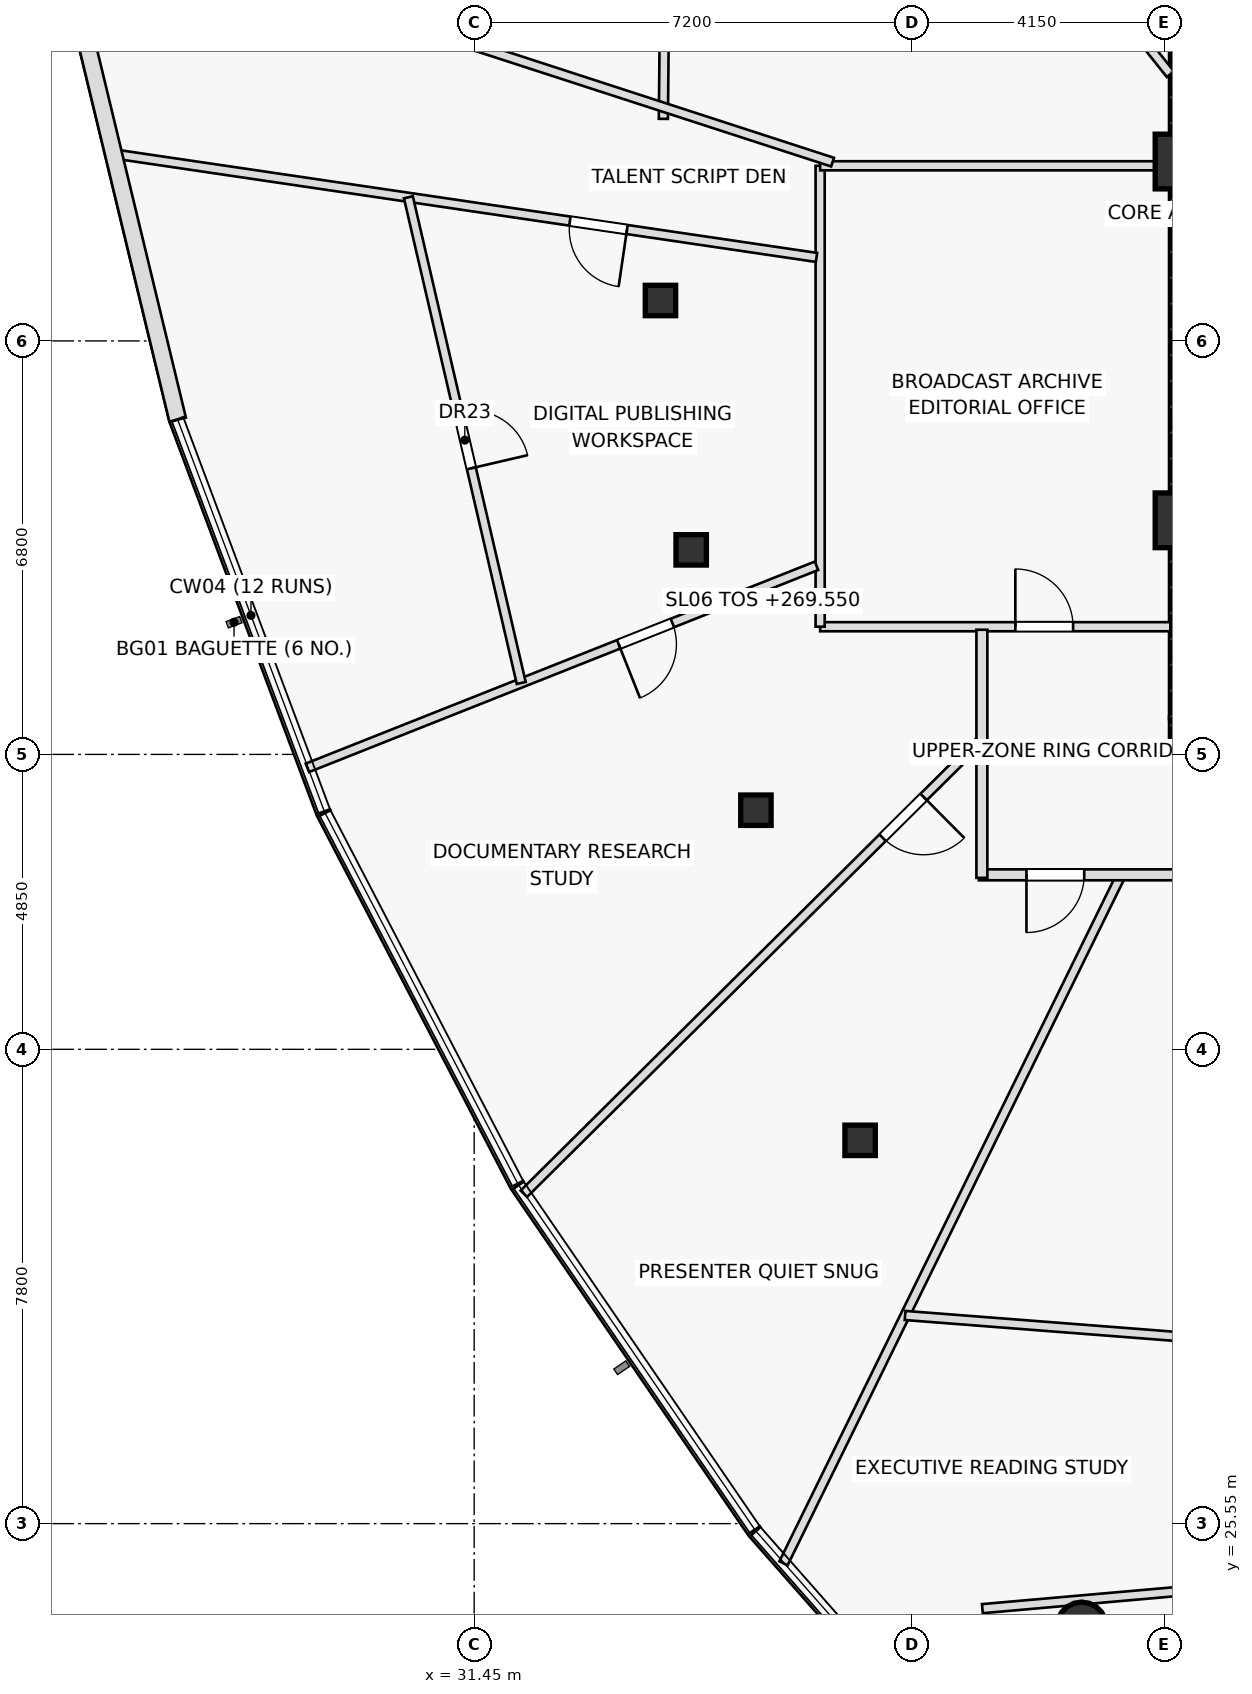
"""IFC4 building model, lengths in metres.
Left out: names, types, materials, properties, quantities, classifications, styles, units other than length and angle.
Written with IfcOpenShell. Run it as: python <this file> out.ifc"""

import sys

from ifc_helpers import new_model, si_unit, direction, frame, frame_2d, origin, origin_2d, place, context, subcontext, project, spatial, rectangle, hollow_rectangle, hollow_circle, extrude, element, fill, save


model = new_model("IFC4")
c1 = context("Model", 3, precision=1e-05, world=origin(), true_north=direction((0.0, 1.0)))
c2 = subcontext(c1, "Body", "Model", "MODEL_VIEW")
j1 = project(units=[si_unit("LENGTHUNIT", "METRE"), si_unit("PLANEANGLEUNIT", "RADIAN")], contexts=[c1])
p1 = place(None, origin())
s1 = spatial("IfcSite", under=j1, at=p1, CompositionType="ELEMENT")
p2 = place(p1, origin())
s2 = spatial("IfcBuilding", under=s1, at=p2, CompositionType="ELEMENT")
p3 = place(p2, frame((0.0, 0.0, 269.55)))
s3 = spatial("IfcBuildingStorey", under=s2, at=p3, CompositionType="ELEMENT", Elevation=269.55)
p4 = place(p3, frame((42.9, 38.55, 0.0), z_axis=(0.0, 0.0, 1.0), x_axis=(1.0, 0.0, 0.0)))
e1 = element("IfcWall", 1, at=p4, inside=s3, PredefinedType="SHEAR", context=c2, shape_type="SweptSolid", body=[
    extrude(rectangle(XDim=14.2, YDim=0.5, at=frame_2d((7.1, 0.0))), origin(), (0.0, 0.0, 1.0), 3.5),
])
p5 = place(p4, frame((0.78, 0.0, 0.0)))
e2 = element("IfcOpeningElement", 2, at=p5, cuts=e1, PredefinedType="OPENING", context=c2, shape_type="SweptSolid", body=[
    extrude(rectangle(XDim=1.05, YDim=2.2, at=frame_2d((0.525, 1.1))), frame((0.0, 0.26, 0.0), z_axis=(0.0, -1.0, 0.0), x_axis=(1.0, 0.0, 0.0)), (0.0, 0.0, 1.0), 0.52),
])
p6 = place(p3, frame((43.15, 38.8, 0.0), z_axis=(0.0, 0.0, 1.0), x_axis=(0.0, 1.0, 0.0)))
e3 = element("IfcWall", 3, at=p6, inside=s3, PredefinedType="SHEAR", context=c2, shape_type="SweptSolid", body=[
    extrude(rectangle(XDim=12.4, YDim=0.5, at=frame_2d((6.2, 0.0))), origin(), (0.0, 0.0, 1.0), 3.5),
])
for number, where, z_axis, x_axis in (
    (4, (43.1, 47.95, 0.0), (0.0, 0.0, 1.0), (1.0, 0.0, 0.0)),
    (5, (43.1, 42.05, 0.0), (0.0, 0.0, 1.0), (1.0, 0.0, 0.0)),
):
    element("IfcColumn", number, at=place(p3, frame(where, z_axis=z_axis, x_axis=x_axis)), inside=s3, PredefinedType="COLUMN", context=c2, shape_type="SweptSolid", body=[
        extrude(rectangle(XDim=0.9, YDim=0.9, at=origin_2d()), origin(), (0.0, 0.0, 1.0), 3.5),
    ])
for number, where, z_axis, x_axis in (
    (6, (34.514, 45.665, 0.0), (0.0, 0.0, 1.0), (1.0, 0.0, 0.0)),
    (7, (35.019, 41.564, 0.0), (0.0, 0.0, 1.0), (1.0, 0.0, 0.0)),
    (8, (36.083, 37.282, 0.0), (0.0, 0.0, 1.0), (1.0, 0.0, 0.0)),
    (9, (37.797, 31.853, 0.0), (0.0, 0.0, 1.0), (1.0, 0.0, 0.0)),
):
    element("IfcColumn", number, at=place(p3, frame(where, z_axis=z_axis, x_axis=x_axis)), inside=s3, PredefinedType="COLUMN", context=c2, shape_type="SweptSolid", body=[
        extrude(hollow_rectangle(XDim=0.5, YDim=0.5, WallThickness=0.03, at=origin_2d()), origin(), (0.0, 0.0, 1.0), 3.5),
    ])
p7 = place(p3, frame((41.44, 23.854, 0.0), z_axis=(0.0, 0.0, 1.0), x_axis=(1.0, 0.0, 0.0)))
e10 = element("IfcColumn", 10, at=p7, inside=s3, PredefinedType="COLUMN", context=c2, shape_type="SweptSolid", body=[
    extrude(hollow_circle(Radius=0.406, WallThickness=0.036, at=origin_2d()), origin(), (0.0, 0.0, 1.0), 3.5),
])
p8 = place(p3, frame((34.652, 58.056, 0.0), z_axis=(0.0, 0.0, 1.0), x_axis=(-0.009553538759, -0.999954363907, 0.0)))
e11 = element("IfcWall", 11, at=p8, inside=s3, PredefinedType="PARTITIONING", context=c2, shape_type="SweptSolid", body=[
    extrude(rectangle(XDim=9.404, YDim=0.15, at=frame_2d((4.702, 0.0))), origin(), (0.0, 0.0, 1.0), 2.195),
])
p9 = place(p3, frame((39.808, 24.152, 0.0), z_axis=(0.0, 0.0, 1.0), x_axis=(0.996153584085, 0.087624408208, 0.0)))
e12 = element("IfcWall", 12, at=p9, inside=s3, PredefinedType="PARTITIONING", context=c2, shape_type="SweptSolid", body=[
    extrude(rectangle(XDim=10.632, YDim=0.15, at=frame_2d((5.316, 0.0))), origin(), (0.0, 0.0, 1.0), 2.195),
])
p10 = place(p3, frame((37.14, 40.3, 0.0), z_axis=(0.0, 0.0, 1.0), x_axis=(1.0, 0.0, 0.0)))
e13 = element("IfcWall", 13, at=p10, inside=s3, PredefinedType="PARTITIONING", context=c2, shape_type="SweptSolid", body=[
    extrude(rectangle(XDim=5.76, YDim=0.15, at=frame_2d((2.88, 0.0))), origin(), (0.0, 0.0, 1.0), 2.195),
])
p11 = place(p10, frame((3.21, 0.0, 0.0)))
e14 = element("IfcOpeningElement", 14, at=p11, cuts=e13, PredefinedType="OPENING", context=c2, shape_type="SweptSolid", body=[
    extrude(rectangle(XDim=0.95, YDim=2.05, at=frame_2d((0.475, 1.025))), frame((0.0, 0.085, 0.0), z_axis=(0.0, -1.0, 0.0), x_axis=(1.0, 0.0, 0.0)), (0.0, 0.0, 1.0), 0.17),
])
p12 = place(p3, frame((37.14, 40.3, 0.0), z_axis=(0.0, 0.0, 1.0), x_axis=(0.0, 1.0, 0.0)))
e15 = element("IfcWall", 15, at=p12, inside=s3, PredefinedType="PARTITIONING", context=c2, shape_type="SweptSolid", body=[
    extrude(rectangle(XDim=7.58, YDim=0.15, at=frame_2d((3.79, 0.0))), origin(), (0.0, 0.0, 1.0), 2.195),
])
p13 = place(p3, frame((37.14, 47.88, 0.0), z_axis=(0.0, 0.0, 1.0), x_axis=(1.0, 0.0, 0.0)))
e16 = element("IfcWall", 16, at=p13, inside=s3, PredefinedType="PARTITIONING", context=c2, shape_type="SweptSolid", body=[
    extrude(rectangle(XDim=5.76, YDim=0.15, at=frame_2d((2.88, 0.0))), origin(), (0.0, 0.0, 1.0), 2.195),
])
p14 = place(p3, frame((42.9, 49.386, 0.0), z_axis=(0.0, 0.0, 1.0), x_axis=(-0.623701083896, 0.781662943951, 0.0)))
e17 = element("IfcWall", 17, at=p14, inside=s3, PredefinedType="PARTITIONING", context=c2, shape_type="SweptSolid", body=[
    extrude(rectangle(XDim=17.652, YDim=0.15, at=frame_2d((8.826, 0.0))), origin(), (0.0, 0.0, 1.0), 2.195),
])
p15 = place(p14, frame((1.35, 0.0, 0.0)))
e18 = element("IfcOpeningElement", 18, at=p15, cuts=e17, PredefinedType="OPENING", context=c2, shape_type="SweptSolid", body=[
    extrude(rectangle(XDim=0.95, YDim=2.05, at=frame_2d((0.475, 1.025))), frame((0.0, 0.085, 0.0), z_axis=(0.0, -1.0, 0.0), x_axis=(1.0, 0.0, 0.0)), (0.0, 0.0, 1.0), 0.17),
])
p16 = place(p3, frame((37.344, 47.94, 0.0), z_axis=(0.0, 0.0, 1.0), x_axis=(-0.951127968225, 0.308797001379, 0.0)))
e19 = element("IfcWall", 19, at=p16, inside=s3, PredefinedType="PARTITIONING", context=c2, shape_type="SweptSolid", body=[
    extrude(rectangle(XDim=13.235, YDim=0.15, at=frame_2d((6.617, 0.0))), origin(), (0.0, 0.0, 1.0), 2.195),
])
p17 = place(p3, frame((37.08, 46.373, 0.0), z_axis=(0.0, 0.0, 1.0), x_axis=(-0.989323142892, 0.145738529351, 0.0)))
e20 = element("IfcWall", 20, at=p17, inside=s3, PredefinedType="PARTITIONING", context=c2, shape_type="SweptSolid", body=[
    extrude(rectangle(XDim=11.698, YDim=0.15, at=frame_2d((5.849, 0.0))), origin(), (0.0, 0.0, 1.0), 2.195),
])
p18 = place(p17, frame((3.15, 0.0, 0.0)))
e21 = element("IfcOpeningElement", 21, at=p18, cuts=e20, PredefinedType="OPENING", context=c2, shape_type="SweptSolid", body=[
    extrude(rectangle(XDim=0.95, YDim=2.05, at=frame_2d((0.475, 1.025))), frame((0.0, 0.085, 0.0), z_axis=(0.0, -1.0, 0.0), x_axis=(1.0, 0.0, 0.0)), (0.0, 0.0, 1.0), 0.17),
])
p19 = place(p3, frame((37.08, 41.302, 0.0), z_axis=(0.0, 0.0, 1.0), x_axis=(-0.929499264933, -0.368823964092, 0.0)))
e22 = element("IfcWall", 22, at=p19, inside=s3, PredefinedType="PARTITIONING", context=c2, shape_type="SweptSolid", body=[
    extrude(rectangle(XDim=9.008, YDim=0.15, at=frame_2d((4.504, 0.0))), origin(), (0.0, 0.0, 1.0), 2.195),
])
p20 = place(p19, frame((2.55, 0.0, 0.0)))
e23 = element("IfcOpeningElement", 23, at=p20, cuts=e22, PredefinedType="OPENING", context=c2, shape_type="SweptSolid", body=[
    extrude(rectangle(XDim=0.95, YDim=2.05, at=frame_2d((0.475, 1.025))), frame((0.0, 0.085, 0.0), z_axis=(0.0, -1.0, 0.0), x_axis=(1.0, 0.0, 0.0)), (0.0, 0.0, 1.0), 0.17),
])
p21 = place(p3, frame((39.8, 38.45, 0.0), z_axis=(0.0, 0.0, 1.0), x_axis=(-0.70980455897, -0.704398671254, 0.0)))
e24 = element("IfcWall", 24, at=p21, inside=s3, PredefinedType="PARTITIONING", context=c2, shape_type="SweptSolid", body=[
    extrude(rectangle(XDim=10.613, YDim=0.15, at=frame_2d((5.307, 0.0))), origin(), (0.0, 0.0, 1.0), 2.195),
])
p22 = place(p21, frame((1.35, 0.0, 0.0)))
e25 = element("IfcOpeningElement", 25, at=p22, cuts=e24, PredefinedType="OPENING", context=c2, shape_type="SweptSolid", body=[
    extrude(rectangle(XDim=0.95, YDim=2.05, at=frame_2d((0.475, 1.025))), frame((0.0, 0.085, 0.0), z_axis=(0.0, -1.0, 0.0), x_axis=(1.0, 0.0, 0.0)), (0.0, 0.0, 1.0), 0.17),
])
p23 = place(p3, frame((42.092, 36.22, 0.0), z_axis=(0.0, 0.0, 1.0), x_axis=(-0.440464441774, -0.89777005716, 0.0)))
e26 = element("IfcWall", 26, at=p23, inside=s3, PredefinedType="PARTITIONING", context=c2, shape_type="SweptSolid", body=[
    extrude(rectangle(XDim=12.612, YDim=0.15, at=frame_2d((6.306, 0.0))), origin(), (0.0, 0.0, 1.0), 2.195),
])
p24 = place(p3, frame((30.368, 47.362, 0.0), z_axis=(0.0, 0.0, 1.0), x_axis=(0.226311824353, -0.974054905105, 0.0)))
e27 = element("IfcWall", 27, at=p24, inside=s3, PredefinedType="PARTITIONING", context=c2, shape_type="SweptSolid", body=[
    extrude(rectangle(XDim=8.2, YDim=0.15, at=frame_2d((4.1, 0.0))), origin(), (0.0, 0.0, 1.0), 3.5),
])
p25 = place(p24, frame((3.625, 0.0, 0.0)))
e28 = element("IfcOpeningElement", 28, at=p25, cuts=e27, PredefinedType="OPENING", context=c2, shape_type="SweptSolid", body=[
    extrude(rectangle(XDim=0.95, YDim=2.05, at=frame_2d((0.475, 1.025))), frame((0.0, 0.085, 0.0), z_axis=(0.0, -1.0, 0.0), x_axis=(1.0, 0.0, 0.0)), (0.0, 0.0, 1.0), 0.17),
])
p26 = place(p3, frame((38.537, 28.973, 0.0), z_axis=(0.0, 0.0, 1.0), x_axis=(0.997017686542, -0.077173393875, 0.0)))
e29 = element("IfcWall", 29, at=p26, inside=s3, PredefinedType="PARTITIONING", context=c2, shape_type="SweptSolid", body=[
    extrude(rectangle(XDim=12.332, YDim=0.15, at=frame_2d((6.166, 0.0))), origin(), (0.0, 0.0, 1.0), 2.195),
])
p27 = place(p26, frame((5.691, 0.0, 0.0)))
e30 = element("IfcOpeningElement", 30, at=p27, cuts=e29, PredefinedType="OPENING", context=c2, shape_type="SweptSolid", body=[
    extrude(rectangle(XDim=0.95, YDim=2.05, at=frame_2d((0.475, 1.025))), frame((0.0, 0.085, 0.0), z_axis=(0.0, -1.0, 0.0), x_axis=(1.0, 0.0, 0.0)), (0.0, 0.0, 1.0), 0.17),
])
p28 = place(p3, frame((59.23, 36.22, 0.0), z_axis=(0.0, 0.0, 1.0), x_axis=(-1.0, 0.0, 0.0)))
e31 = element("IfcWall", 31, at=p28, inside=s3, PredefinedType="PARTITIONING", context=c2, shape_type="SweptSolid", body=[
    extrude(rectangle(XDim=19.48, YDim=0.18, at=frame_2d((9.74, 0.0))), origin(), (0.0, 0.0, 1.0), 2.195),
])
p29 = place(p28, frame((4.071, 0.0, 0.0)))
e32 = element("IfcOpeningElement", 32, at=p29, cuts=e31, PredefinedType="OPENING", context=c2, shape_type="SweptSolid", body=[
    extrude(rectangle(XDim=0.95, YDim=2.05, at=frame_2d((0.475, 1.025))), frame((0.0, 0.1, 0.0), z_axis=(0.0, -1.0, 0.0), x_axis=(1.0, 0.0, 0.0)), (0.0, 0.0, 1.0), 0.2),
])
p30 = place(p28, frame((8.583, 0.0, 0.0)))
e33 = element("IfcOpeningElement", 33, at=p30, cuts=e31, PredefinedType="OPENING", context=c2, shape_type="SweptSolid", body=[
    extrude(rectangle(XDim=0.95, YDim=2.05, at=frame_2d((0.475, 1.025))), frame((0.0, 0.1, 0.0), z_axis=(0.0, -1.0, 0.0), x_axis=(1.0, 0.0, 0.0)), (0.0, 0.0, 1.0), 0.2),
])
p31 = place(p28, frame((13.372, 0.0, 0.0)))
e34 = element("IfcOpeningElement", 34, at=p31, cuts=e31, PredefinedType="OPENING", context=c2, shape_type="SweptSolid", body=[
    extrude(rectangle(XDim=0.95, YDim=2.05, at=frame_2d((0.475, 1.025))), frame((0.0, 0.1, 0.0), z_axis=(0.0, -1.0, 0.0), x_axis=(1.0, 0.0, 0.0)), (0.0, 0.0, 1.0), 0.2),
])
p32 = place(p28, frame((17.747, 0.0, 0.0)))
e35 = element("IfcOpeningElement", 35, at=p32, cuts=e31, PredefinedType="OPENING", context=c2, shape_type="SweptSolid", body=[
    extrude(rectangle(XDim=0.95, YDim=2.05, at=frame_2d((0.475, 1.025))), frame((0.0, 0.1, 0.0), z_axis=(0.0, -1.0, 0.0), x_axis=(1.0, 0.0, 0.0)), (0.0, 0.0, 1.0), 0.2),
])
p33 = place(p3, frame((39.8, 36.17, 0.0), z_axis=(0.0, 0.0, 1.0), x_axis=(0.0, 1.0, 0.0)))
e36 = element("IfcWall", 36, at=p33, inside=s3, PredefinedType="PARTITIONING", context=c2, shape_type="SweptSolid", body=[
    extrude(rectangle(XDim=4.08, YDim=0.18, at=frame_2d((2.04, 0.0))), origin(), (0.0, 0.0, 1.0), 2.195),
])
p34 = place(p3, frame((24.95, 50.43, 0.0), z_axis=(0.0, 0.0, 1.0), x_axis=(0.234663533008, -0.972076656584, 0.0)))
e37 = element("IfcWall", 37, at=p34, inside=s3, PredefinedType="STANDARD", context=c2, shape_type="SweptSolid", body=[
    extrude(rectangle(XDim=6.917, YDim=0.28, at=frame_2d((3.459, 0.0))), origin(), (0.0, 0.0, 1.0), 3.5),
])
p35 = place(p11, origin())
e38 = element("IfcDoor", 38, at=p35, inside=s3, OperationType="SINGLE_SWING_LEFT", PredefinedType="DOOR", context=c2, shape_type="SweptSolid", body=[
    extrude(rectangle(XDim=0.95, YDim=2.05, at=frame_2d((0.475, 1.025))), frame((0.0, 0.025, 0.0), z_axis=(0.0, -1.0, 0.0), x_axis=(1.0, 0.0, 0.0)), (0.0, 0.0, 1.0), 0.05),
])
fill(e14, e38)
p36 = place(p18, origin())
e39 = element("IfcDoor", 39, at=p36, inside=s3, OperationType="SINGLE_SWING_LEFT", PredefinedType="DOOR", context=c2, shape_type="SweptSolid", body=[
    extrude(rectangle(XDim=0.95, YDim=2.05, at=frame_2d((0.475, 1.025))), frame((0.0, 0.025, 0.0), z_axis=(0.0, -1.0, 0.0), x_axis=(1.0, 0.0, 0.0)), (0.0, 0.0, 1.0), 0.05),
])
fill(e21, e39)
p37 = place(p20, origin())
e40 = element("IfcDoor", 40, at=p37, inside=s3, OperationType="SINGLE_SWING_RIGHT", PredefinedType="DOOR", context=c2, shape_type="SweptSolid", body=[
    extrude(rectangle(XDim=0.95, YDim=2.05, at=frame_2d((0.475, 1.025))), frame((0.0, 0.025, 0.0), z_axis=(0.0, -1.0, 0.0), x_axis=(1.0, 0.0, 0.0)), (0.0, 0.0, 1.0), 0.05),
])
fill(e23, e40)
p38 = place(p22, origin())
e41 = element("IfcDoor", 41, at=p38, inside=s3, OperationType="SINGLE_SWING_LEFT", PredefinedType="DOOR", context=c2, shape_type="SweptSolid", body=[
    extrude(rectangle(XDim=0.95, YDim=2.05, at=frame_2d((0.475, 1.025))), frame((0.0, 0.025, 0.0), z_axis=(0.0, -1.0, 0.0), x_axis=(1.0, 0.0, 0.0)), (0.0, 0.0, 1.0), 0.05),
])
fill(e25, e41)
p39 = place(p25, origin())
e42 = element("IfcDoor", 42, at=p39, inside=s3, OperationType="SINGLE_SWING_RIGHT", PredefinedType="DOOR", context=c2, shape_type="SweptSolid", body=[
    extrude(rectangle(XDim=0.95, YDim=2.05, at=frame_2d((0.475, 1.025))), frame((0.0, 0.025, 0.0), z_axis=(0.0, -1.0, 0.0), x_axis=(1.0, 0.0, 0.0)), (0.0, 0.0, 1.0), 0.05),
])
fill(e28, e42)
p40 = place(p32, origin())
e43 = element("IfcDoor", 43, at=p40, inside=s3, OperationType="SINGLE_SWING_RIGHT", PredefinedType="DOOR", context=c2, shape_type="SweptSolid", body=[
    extrude(rectangle(XDim=0.95, YDim=2.05, at=frame_2d((0.475, 1.025))), frame((0.0, 0.025, 0.0), z_axis=(0.0, -1.0, 0.0), x_axis=(1.0, 0.0, 0.0)), (0.0, 0.0, 1.0), 0.05),
])
fill(e35, e43)
save(model, sys.argv[1])
